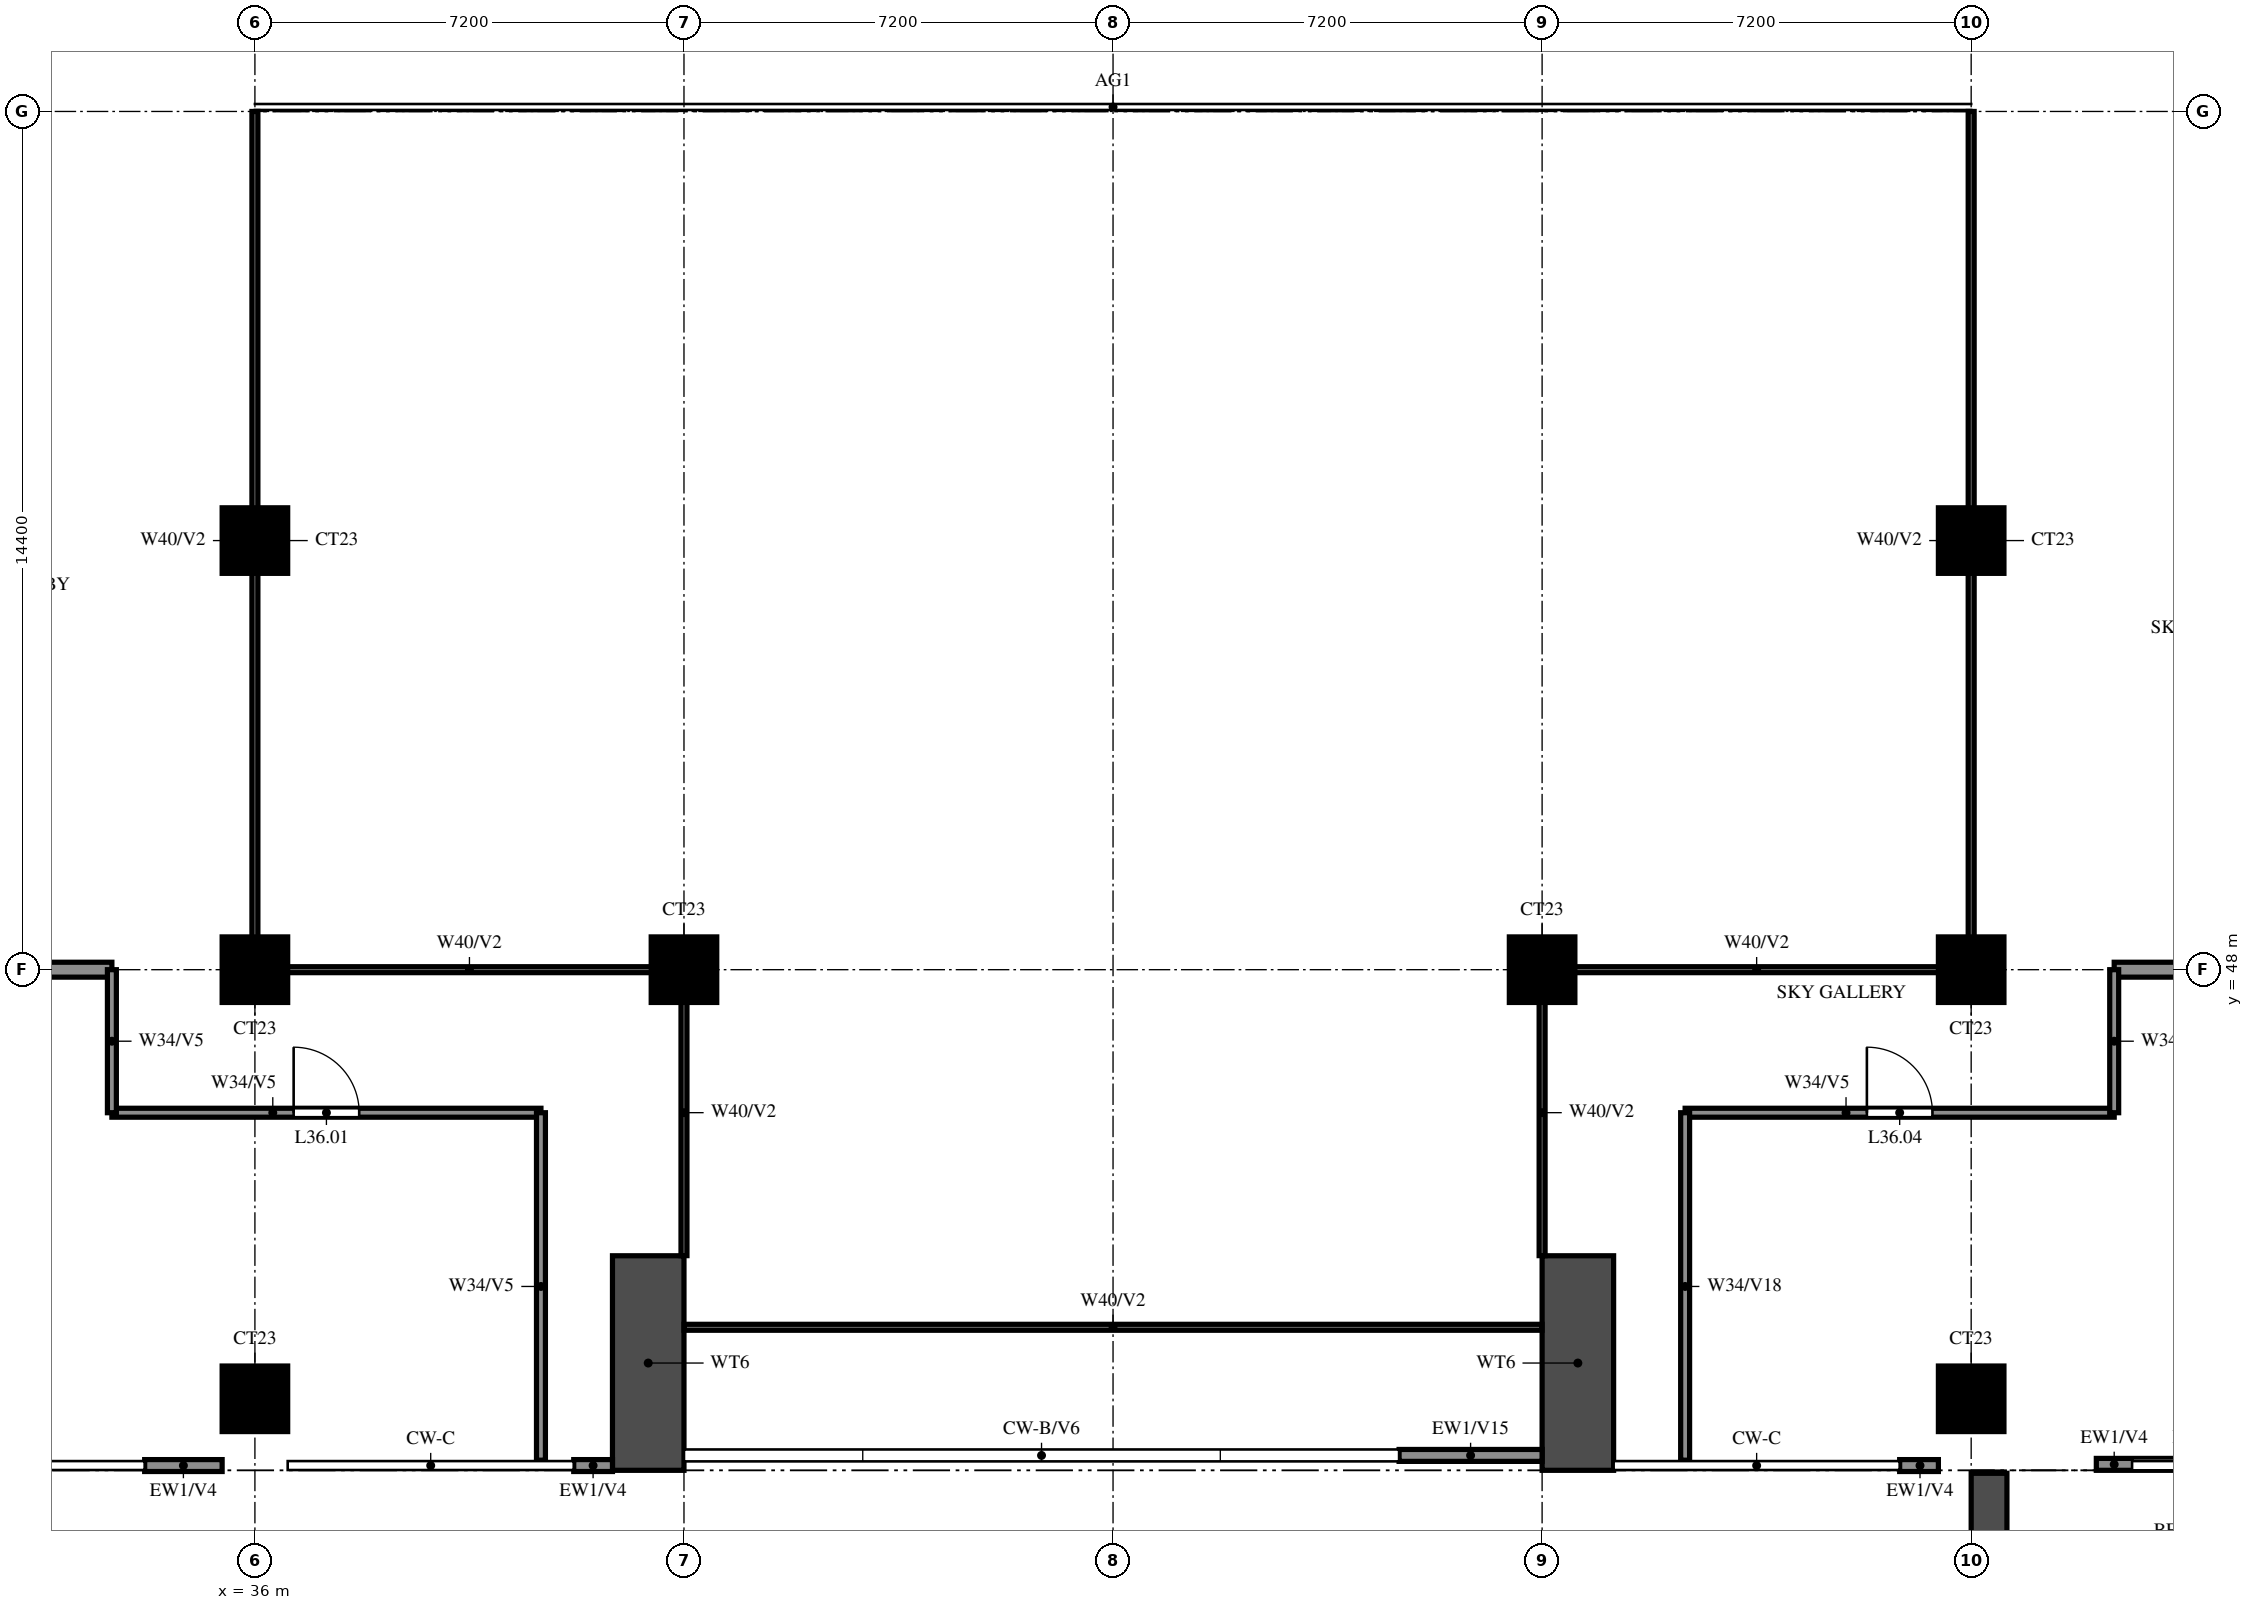
"""IFC4 building model, lengths in metres.
Left out: names, types, materials, properties, quantities, classifications, styles, units other than length and angle.
Written with IfcOpenShell. Run it as: python <this file> out.ifc"""

import sys

from ifc_helpers import new_model, si_unit, direction, frame, frame_2d, origin, origin_2d, place, context, subcontext, project, spatial, rectangle, extrude, source, transform, mapped, element, fill, save


model = new_model("IFC4")
c1 = context("Model", 3, precision=1e-05, world=origin(), true_north=direction((0.0, 1.0)))
c2 = subcontext(c1, "Body", "Model", "MODEL_VIEW")
j1 = project(units=[si_unit("LENGTHUNIT", "METRE"), si_unit("PLANEANGLEUNIT", "RADIAN")], contexts=[c1])
p1 = place(None, origin())
s1 = spatial("IfcSite", under=j1, at=p1, CompositionType="ELEMENT")
p2 = place(p1, origin())
s2 = spatial("IfcBuilding", under=s1, at=p2, CompositionType="ELEMENT")
p3 = place(p2, frame((0.0, 0.0, 137.5)))
s3 = spatial("IfcBuildingStorey", under=s2, at=p3, CompositionType="ELEMENT", Elevation=137.5)
m1 = source(origin(), c2, "Body", "SweptSolid", [
    extrude(rectangle(XDim=1.1, YDim=1.1, at=origin_2d()), origin(), (0.0, 0.0, 1.0), 5.2),
])
for number, where, z_axis, x_axis in (
    (1, (36.0, 40.8, 0.0), (0.0, 0.0, 1.0), (1.0, 0.0, 0.0)),
    (2, (64.8, 40.8, 0.0), (0.0, 0.0, 1.0), (1.0, 0.0, 0.0)),
    (3, (36.0, 48.0, 0.0), (0.0, 0.0, 1.0), (1.0, 0.0, 0.0)),
    (4, (43.2, 48.0, 0.0), (0.0, 0.0, 1.0), (1.0, 0.0, 0.0)),
    (5, (57.6, 48.0, 0.0), (0.0, 0.0, 1.0), (1.0, 0.0, 0.0)),
    (6, (64.8, 48.0, 0.0), (0.0, 0.0, 1.0), (1.0, 0.0, 0.0)),
    (7, (36.0, 55.2, 0.0), (0.0, 0.0, 1.0), (1.0, 0.0, 0.0)),
    (8, (64.8, 55.2, 0.0), (0.0, 0.0, 1.0), (1.0, 0.0, 0.0)),
):
    element("IfcColumn", number, at=place(p3, frame(where, z_axis=z_axis, x_axis=x_axis)), inside=s3, PredefinedType="COLUMN", context=c2, shape_type="MappedRepresentation", body=[
        mapped(m1, transform((0.0, 0.0, 0.0))),
    ])
for number, where, z_axis, x_axis in (
    (9, (42.6, 39.6, 0.0), (0.0, 0.0, 1.0), (0.0, 1.0, 0.0)),
    (10, (58.2, 39.6, 0.0), (0.0, 0.0, 1.0), (0.0, 1.0, 0.0)),
):
    element("IfcWall", number, at=place(p3, frame(where, z_axis=z_axis, x_axis=x_axis)), inside=s3, PredefinedType="SHEAR", context=c2, shape_type="SweptSolid", body=[
        extrude(rectangle(XDim=3.6, YDim=1.2, at=frame_2d((1.8, 0.0))), origin(), (0.0, 0.0, 1.0), 5.2),
    ])
p4 = place(p3, frame((66.9, 39.7, 0.0), z_axis=(0.0, 0.0, 1.0), x_axis=(1.0, 0.0, 0.0)))
e11 = element("IfcWall", 11, at=p4, inside=s3, PredefinedType="SOLIDWALL", context=c2, shape_type="SweptSolid", body=[
    extrude(rectangle(XDim=3.0, YDim=0.2, at=frame_2d((1.5, 0.0))), origin(), (0.0, 0.0, 1.0), 5.2),
])
p5 = place(p4, frame((0.6, 0.0, 0.0)))
e12 = element("IfcOpeningElement", 12, at=p5, cuts=e11, PredefinedType="OPENING", context=c2, shape_type="SweptSolid", body=[
    extrude(rectangle(XDim=1.8, YDim=2.4, at=frame_2d((0.9, 1.2))), frame((0.0, 0.11, 0.0), z_axis=(0.0, -1.0, 0.0), x_axis=(1.0, 0.0, 0.0)), (0.0, 0.0, 1.0), 0.22),
])
p6 = place(p3, frame((34.15, 39.68, 0.0), z_axis=(0.0, 0.0, 1.0), x_axis=(1.0, 0.0, 0.0)))
e13 = element("IfcWall", 13, at=p6, inside=s3, PredefinedType="SOLIDWALL", context=c2, shape_type="SweptSolid", body=[
    extrude(rectangle(XDim=1.3, YDim=0.2, at=frame_2d((0.65, 0.0))), origin(), (0.0, 0.0, 1.0), 5.2),
])
for number, where, z_axis, x_axis in (
    (14, (41.35, 39.68, 0.0), (0.0, 0.0, 1.0), (1.0, 0.0, 0.0)),
    (15, (63.6, 39.68, 0.0), (0.0, 0.0, 1.0), (1.0, 0.0, 0.0)),
):
    element("IfcWall", number, at=place(p3, frame(where, z_axis=z_axis, x_axis=x_axis)), inside=s3, PredefinedType="SOLIDWALL", context=c2, shape_type="SweptSolid", body=[
        extrude(rectangle(XDim=0.65, YDim=0.2, at=frame_2d((0.325, 0.0))), origin(), (0.0, 0.0, 1.0), 5.2),
    ])
p7 = place(p3, frame((55.2, 39.85, 0.0), z_axis=(0.0, 0.0, 1.0), x_axis=(1.0, 0.0, 0.0)))
e16 = element("IfcWall", 16, at=p7, inside=s3, PredefinedType="SOLIDWALL", context=c2, shape_type="SweptSolid", body=[
    extrude(rectangle(XDim=2.4, YDim=0.2, at=frame_2d((1.2, 0.0))), origin(), (0.0, 0.0, 1.0), 4.0),
])
p8 = place(p3, frame((65.1, 39.55, 0.0), z_axis=(0.0, 0.0, 1.0), x_axis=(0.0, -1.0, 0.0)))
e17 = element("IfcWall", 17, at=p8, inside=s3, PredefinedType="SOLIDWALL", context=c2, shape_type="SweptSolid", body=[
    extrude(rectangle(XDim=2.65, YDim=0.6, at=frame_2d((1.325, 0.0))), origin(), (0.0, 0.0, 1.0), 4.9),
])
p9 = place(p3, frame((43.202, 42.0, 0.0), z_axis=(0.0, 0.0, 1.0), x_axis=(1.0, 0.0, 0.0)))
e18 = element("IfcWall", 18, at=p9, inside=s3, PredefinedType="PARTITIONING", context=c2, shape_type="SweptSolid", body=[
    extrude(rectangle(XDim=14.396, YDim=0.1, at=frame_2d((7.198, 0.0))), origin(), (0.0, 0.0, 1.0), 4.3),
])
p10 = place(p3, frame((33.6, 45.6, 0.0), z_axis=(0.0, 0.0, 1.0), x_axis=(1.0, 0.0, 0.0)))
e19 = element("IfcWall", 19, at=p10, inside=s3, PredefinedType="PARTITIONING", context=c2, shape_type="SweptSolid", body=[
    extrude(rectangle(XDim=7.2, YDim=0.15, at=frame_2d((3.6, 0.0))), origin(), (0.0, 0.0, 1.0), 5.2),
])
p11 = place(p10, frame((3.05, 0.0, 0.0)))
e20 = element("IfcOpeningElement", 20, at=p11, cuts=e19, PredefinedType="OPENING", context=c2, shape_type="SweptSolid", body=[
    extrude(rectangle(XDim=1.1, YDim=2.1, at=frame_2d((0.55, 1.05))), frame((0.0, 0.085, 0.0), z_axis=(0.0, -1.0, 0.0), x_axis=(1.0, 0.0, 0.0)), (0.0, 0.0, 1.0), 0.17),
])
p12 = place(p3, frame((60.0, 45.6, 0.0), z_axis=(0.0, 0.0, 1.0), x_axis=(1.0, 0.0, 0.0)))
e21 = element("IfcWall", 21, at=p12, inside=s3, PredefinedType="PARTITIONING", context=c2, shape_type="SweptSolid", body=[
    extrude(rectangle(XDim=7.2, YDim=0.15, at=frame_2d((3.6, 0.0))), origin(), (0.0, 0.0, 1.0), 5.2),
])
p13 = place(p12, frame((3.05, 0.0, 0.0)))
e22 = element("IfcOpeningElement", 22, at=p13, cuts=e21, PredefinedType="OPENING", context=c2, shape_type="SweptSolid", body=[
    extrude(rectangle(XDim=1.1, YDim=2.1, at=frame_2d((0.55, 1.05))), frame((0.0, 0.085, 0.0), z_axis=(0.0, -1.0, 0.0), x_axis=(1.0, 0.0, 0.0)), (0.0, 0.0, 1.0), 0.17),
])
for number, where, z_axis, x_axis in (
    (23, (36.0, 48.0, 0.0), (0.0, 0.0, 1.0), (1.0, 0.0, 0.0)),
    (24, (57.6, 48.0, 0.0), (0.0, 0.0, 1.0), (1.0, 0.0, 0.0)),
):
    element("IfcWall", number, at=place(p3, frame(where, z_axis=z_axis, x_axis=x_axis)), inside=s3, PredefinedType="PARTITIONING", context=c2, shape_type="SweptSolid", body=[
        extrude(rectangle(XDim=7.2, YDim=0.1, at=frame_2d((3.6, 0.0))), origin(), (0.0, 0.0, 1.0), 4.3),
    ])
p14 = place(p3, frame((14.57, 48.0, 0.0), z_axis=(0.0, 0.0, 1.0), x_axis=(1.0, 0.0, 0.0)))
e25 = element("IfcWall", 25, at=p14, inside=s3, PredefinedType="SOLIDWALL", context=c2, shape_type="SweptSolid", body=[
    extrude(rectangle(XDim=19.03, YDim=0.25, at=frame_2d((9.515, 0.0))), origin(), (0.0, 0.0, 1.0), 5.2),
])
p15 = place(p3, frame((67.2, 48.0, 0.0), z_axis=(0.0, 0.0, 1.0), x_axis=(1.0, 0.0, 0.0)))
e26 = element("IfcWall", 26, at=p15, inside=s3, PredefinedType="SOLIDWALL", context=c2, shape_type="SweptSolid", body=[
    extrude(rectangle(XDim=4.63, YDim=0.25, at=frame_2d((2.315, 0.0))), origin(), (0.0, 0.0, 1.0), 5.2),
])
p16 = place(p3, frame((33.6, 45.6, 0.0), z_axis=(0.0, 0.0, 1.0), x_axis=(0.0, 1.0, 0.0)))
e27 = element("IfcWall", 27, at=p16, inside=s3, PredefinedType="PARTITIONING", context=c2, shape_type="SweptSolid", body=[
    extrude(rectangle(XDim=2.4, YDim=0.15, at=frame_2d((1.2, 0.0))), origin(), (0.0, 0.0, 1.0), 5.2),
])
p17 = place(p3, frame((36.0, 48.0, 0.0), z_axis=(0.0, 0.0, 1.0), x_axis=(0.0, 1.0, 0.0)))
e28 = element("IfcWall", 28, at=p17, inside=s3, PredefinedType="PARTITIONING", context=c2, shape_type="SweptSolid", body=[
    extrude(rectangle(XDim=14.4, YDim=0.1, at=frame_2d((7.2, 0.0))), origin(), (0.0, 0.0, 1.0), 4.3),
])
p18 = place(p3, frame((40.8, 39.77, 0.0), z_axis=(0.0, 0.0, 1.0), x_axis=(0.0, 1.0, 0.0)))
e29 = element("IfcWall", 29, at=p18, inside=s3, PredefinedType="PARTITIONING", context=c2, shape_type="SweptSolid", body=[
    extrude(rectangle(XDim=5.83, YDim=0.15, at=frame_2d((2.915, 0.0))), origin(), (0.0, 0.0, 1.0), 5.2),
])
for number, where, z_axis, x_axis in (
    (30, (43.2, 43.202, 0.0), (0.0, 0.0, 1.0), (0.0, 1.0, 0.0)),
    (31, (57.6, 43.202, 0.0), (0.0, 0.0, 1.0), (0.0, 1.0, 0.0)),
):
    element("IfcWall", number, at=place(p3, frame(where, z_axis=z_axis, x_axis=x_axis)), inside=s3, PredefinedType="PARTITIONING", context=c2, shape_type="SweptSolid", body=[
        extrude(rectangle(XDim=4.798, YDim=0.1, at=frame_2d((2.399, 0.0))), origin(), (0.0, 0.0, 1.0), 4.3),
    ])
p19 = place(p3, frame((60.0, 39.77, 0.0), z_axis=(0.0, 0.0, 1.0), x_axis=(0.0, 1.0, 0.0)))
e32 = element("IfcWall", 32, at=p19, inside=s3, PredefinedType="PARTITIONING", context=c2, shape_type="SweptSolid", body=[
    extrude(rectangle(XDim=5.83, YDim=0.15, at=frame_2d((2.915, 0.0))), origin(), (0.0, 0.0, 1.0), 4.0),
])
p20 = place(p3, frame((64.8, 48.0, 0.0), z_axis=(0.0, 0.0, 1.0), x_axis=(0.0, 1.0, 0.0)))
e33 = element("IfcWall", 33, at=p20, inside=s3, PredefinedType="PARTITIONING", context=c2, shape_type="SweptSolid", body=[
    extrude(rectangle(XDim=14.4, YDim=0.1, at=frame_2d((7.2, 0.0))), origin(), (0.0, 0.0, 1.0), 4.3),
])
p21 = place(p3, frame((67.2, 45.6, 0.0), z_axis=(0.0, 0.0, 1.0), x_axis=(0.0, 1.0, 0.0)))
e34 = element("IfcWall", 34, at=p21, inside=s3, PredefinedType="PARTITIONING", context=c2, shape_type="SweptSolid", body=[
    extrude(rectangle(XDim=2.4, YDim=0.15, at=frame_2d((1.2, 0.0))), origin(), (0.0, 0.0, 1.0), 5.2),
])
p22 = place(p5, origin())
e35 = element("IfcDoor", 35, at=p22, inside=s3, OperationType="DOUBLE_DOOR_SLIDING", PredefinedType="DOOR", context=c2, shape_type="SweptSolid", body=[
    extrude(rectangle(XDim=1.8, YDim=2.4, at=frame_2d((0.9, 1.2))), frame((0.0, 0.025, 0.0), z_axis=(0.0, -1.0, 0.0), x_axis=(1.0, 0.0, 0.0)), (0.0, 0.0, 1.0), 0.05),
])
fill(e12, e35)
p23 = place(p11, origin())
e36 = element("IfcDoor", 36, at=p23, inside=s3, OperationType="SINGLE_SWING_RIGHT", PredefinedType="DOOR", context=c2, shape_type="SweptSolid", body=[
    extrude(rectangle(XDim=1.1, YDim=2.1, at=frame_2d((0.55, 1.05))), frame((0.0, 0.025, 0.0), z_axis=(0.0, -1.0, 0.0), x_axis=(1.0, 0.0, 0.0)), (0.0, 0.0, 1.0), 0.05),
])
fill(e20, e36)
p24 = place(p13, origin())
e37 = element("IfcDoor", 37, at=p24, inside=s3, OperationType="SINGLE_SWING_RIGHT", PredefinedType="DOOR", context=c2, shape_type="SweptSolid", body=[
    extrude(rectangle(XDim=1.1, YDim=2.1, at=frame_2d((0.55, 1.05))), frame((0.0, 0.025, 0.0), z_axis=(0.0, -1.0, 0.0), x_axis=(1.0, 0.0, 0.0)), (0.0, 0.0, 1.0), 0.05),
])
fill(e22, e37)
save(model, sys.argv[1])
